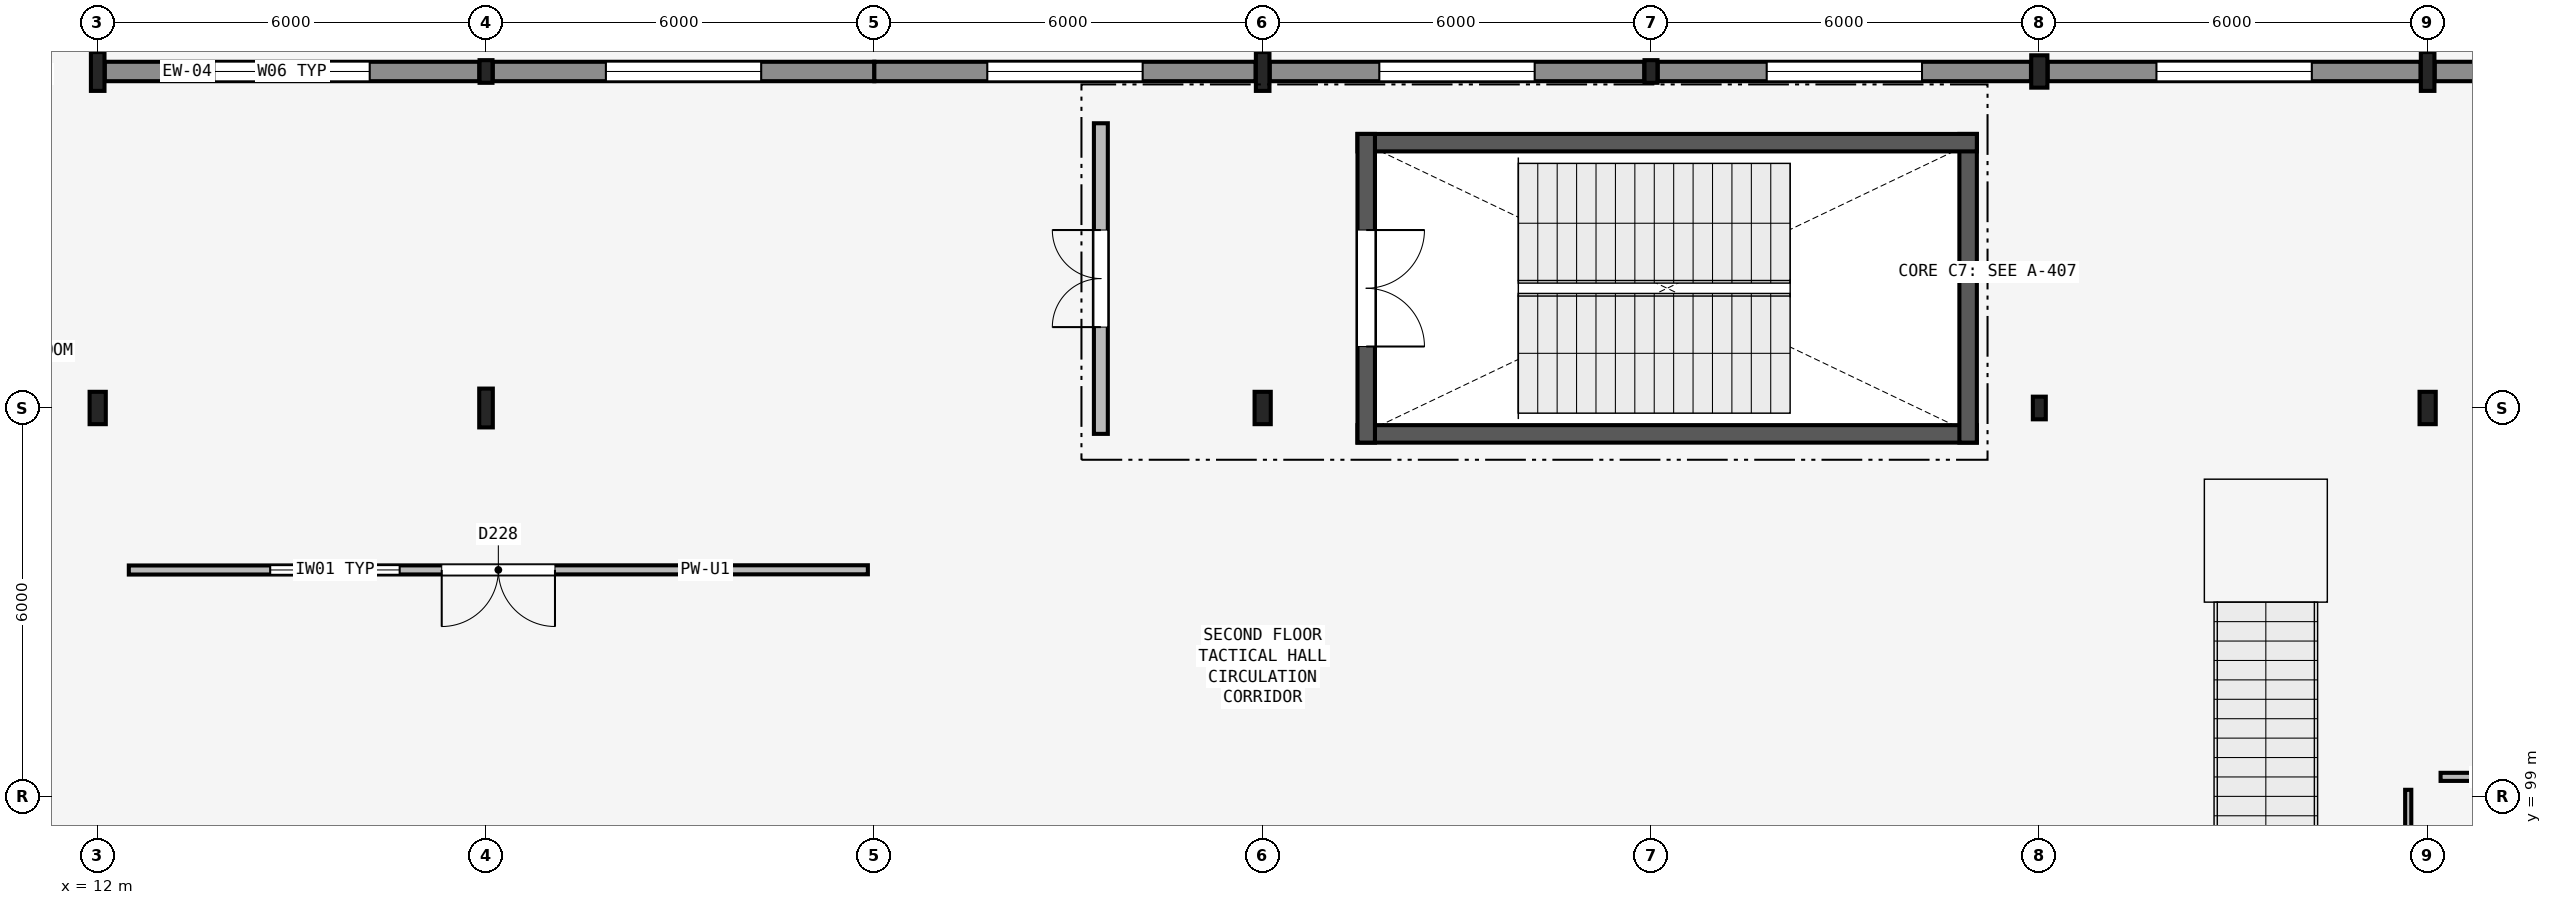
"""IFC4 building model, lengths in metres.
Left out: names, types, materials, properties, quantities, classifications, styles, units other than length and angle.
Written with IfcOpenShell. Run it as: python <this file> out.ifc"""

import sys

from ifc_helpers import new_model, si_unit, direction, frame, frame_2d, origin, origin_2d, place, context, subcontext, project, spatial, rectangle, hollow_rectangle, i_section, extrude, element, fill, save


model = new_model("IFC4")
c1 = context("Model", 3, precision=1e-05, world=origin(), true_north=direction((0.0, 1.0)))
c2 = subcontext(c1, "Body", "Model", "MODEL_VIEW")
j1 = project(units=[si_unit("LENGTHUNIT", "METRE"), si_unit("PLANEANGLEUNIT", "RADIAN")], contexts=[c1])
p1 = place(None, origin())
s1 = spatial("IfcSite", under=j1, at=p1, CompositionType="ELEMENT")
p2 = place(p1, origin())
s2 = spatial("IfcBuilding", under=s1, at=p2, CompositionType="ELEMENT")
p3 = place(p2, frame((0.0, 0.0, 9.3)))
s3 = spatial("IfcBuildingStorey", under=s2, at=p3, CompositionType="ELEMENT", Elevation=9.3)
p4 = place(p3, frame((12.0, 105.0, 0.0), z_axis=(0.0, 0.0, 1.0), x_axis=(1.0, 0.0, 0.0)))
e1 = element("IfcColumn", 1, at=p4, inside=s3, PredefinedType="COLUMN", context=c2, shape_type="SweptSolid", body=[
    extrude(i_section(OverallWidth=0.25, OverallDepth=0.5, WebThickness=0.01, FlangeThickness=0.015, FilletRadius=0.015, at=origin_2d()), origin(), (0.0, 0.0, 1.0), 4.2),
])
for number, where, z_axis, x_axis in (
    (2, (12.0, 110.2, 0.0), (0.0, 0.0, 1.0), (1.0, 0.0, 0.0)),
    (3, (18.0, 105.0, 0.0), (0.0, 0.0, 1.0), (1.0, 0.0, 0.0)),
):
    element("IfcColumn", number, at=place(p3, frame(where, z_axis=z_axis, x_axis=x_axis)), inside=s3, PredefinedType="COLUMN", context=c2, shape_type="SweptSolid", body=[
        extrude(i_section(OverallWidth=0.21, OverallDepth=0.6, WebThickness=0.012, FlangeThickness=0.021, FilletRadius=0.02, at=origin_2d()), origin(), (0.0, 0.0, 1.0), 4.2),
    ])
p5 = place(p3, frame((18.0, 110.2, 0.0), z_axis=(0.0, 0.0, 1.0), x_axis=(1.0, 0.0, 0.0)))
e4 = element("IfcColumn", 4, at=p5, inside=s3, PredefinedType="COLUMN", context=c2, shape_type="SweptSolid", body=[
    extrude(hollow_rectangle(XDim=0.2, YDim=0.35, WallThickness=0.012, InnerFilletRadius=0.012, OuterFilletRadius=0.024, at=origin_2d()), origin(), (0.0, 0.0, 1.0), 4.2),
])
p6 = place(p3, frame((30.0, 105.0, 0.0), z_axis=(0.0, 0.0, 1.0), x_axis=(1.0, 0.0, 0.0)))
e5 = element("IfcColumn", 5, at=p6, inside=s3, PredefinedType="COLUMN", context=c2, shape_type="SweptSolid", body=[
    extrude(i_section(OverallWidth=0.25, OverallDepth=0.5, WebThickness=0.01, FlangeThickness=0.015, FilletRadius=0.015, at=origin_2d()), origin(), (0.0, 0.0, 1.0), 4.2),
])
p7 = place(p3, frame((30.0, 110.2, 0.0), z_axis=(0.0, 0.0, 1.0), x_axis=(1.0, 0.0, 0.0)))
e6 = element("IfcColumn", 6, at=p7, inside=s3, PredefinedType="COLUMN", context=c2, shape_type="SweptSolid", body=[
    extrude(i_section(OverallWidth=0.21, OverallDepth=0.6, WebThickness=0.012, FlangeThickness=0.021, FilletRadius=0.02, at=origin_2d()), origin(), (0.0, 0.0, 1.0), 4.2),
])
for number, where, z_axis, x_axis in (
    (7, (36.0, 110.2, 0.0), (0.0, 0.0, 1.0), (1.0, 0.0, 0.0)),
    (8, (42.0, 105.0, 0.0), (0.0, 0.0, 1.0), (1.0, 0.0, 0.0)),
):
    element("IfcColumn", number, at=place(p3, frame(where, z_axis=z_axis, x_axis=x_axis)), inside=s3, PredefinedType="COLUMN", context=c2, shape_type="SweptSolid", body=[
        extrude(hollow_rectangle(XDim=0.2, YDim=0.35, WallThickness=0.012, InnerFilletRadius=0.012, OuterFilletRadius=0.024, at=origin_2d()), origin(), (0.0, 0.0, 1.0), 4.2),
    ])
for number, where, z_axis, x_axis in (
    (9, (42.0, 110.2, 0.0), (0.0, 0.0, 1.0), (1.0, 0.0, 0.0)),
    (10, (48.0, 105.0, 0.0), (0.0, 0.0, 1.0), (1.0, 0.0, 0.0)),
):
    element("IfcColumn", number, at=place(p3, frame(where, z_axis=z_axis, x_axis=x_axis)), inside=s3, PredefinedType="COLUMN", context=c2, shape_type="SweptSolid", body=[
        extrude(i_section(OverallWidth=0.25, OverallDepth=0.5, WebThickness=0.01, FlangeThickness=0.015, FilletRadius=0.015, at=origin_2d()), origin(), (0.0, 0.0, 1.0), 4.2),
    ])
p8 = place(p3, frame((48.0, 110.2, 0.0), z_axis=(0.0, 0.0, 1.0), x_axis=(1.0, 0.0, 0.0)))
e11 = element("IfcColumn", 11, at=p8, inside=s3, PredefinedType="COLUMN", context=c2, shape_type="SweptSolid", body=[
    extrude(i_section(OverallWidth=0.21, OverallDepth=0.6, WebThickness=0.012, FlangeThickness=0.021, FilletRadius=0.02, at=origin_2d()), origin(), (0.0, 0.0, 1.0), 4.2),
])
p9 = place(p3, frame((12.109, 110.2, 0.0), z_axis=(0.0, 0.0, 1.0), x_axis=(1.0, 0.0, 0.0)))
e12 = element("IfcWall", 12, at=p9, inside=s3, PredefinedType="SOLIDWALL", context=c2, shape_type="SweptSolid", body=[
    extrude(rectangle(XDim=5.787, YDim=0.3, at=frame_2d((2.894, 0.0))), origin(), (0.0, 0.0, 1.0), 3.09),
])
p10 = place(p9, frame((1.694, 0.0, 1.1)))
e13 = element("IfcOpeningElement", 13, at=p10, cuts=e12, PredefinedType="OPENING", context=c2, shape_type="SweptSolid", body=[
    extrude(rectangle(XDim=2.4, YDim=1.2, at=frame_2d((1.2, 0.6))), frame((0.0, 0.16, 0.0), z_axis=(0.0, -1.0, 0.0), x_axis=(1.0, 0.0, 0.0)), (0.0, 0.0, 1.0), 0.32),
])
p11 = place(p3, frame((18.104, 110.2, 0.0), z_axis=(0.0, 0.0, 1.0), x_axis=(1.0, 0.0, 0.0)))
e14 = element("IfcWall", 14, at=p11, inside=s3, PredefinedType="SOLIDWALL", context=c2, shape_type="SweptSolid", body=[
    extrude(rectangle(XDim=5.896, YDim=0.3, at=frame_2d((2.948, 0.0))), origin(), (0.0, 0.0, 1.0), 3.09),
])
p12 = place(p11, frame((1.748, 0.0, 1.1)))
e15 = element("IfcOpeningElement", 15, at=p12, cuts=e14, PredefinedType="OPENING", context=c2, shape_type="SweptSolid", body=[
    extrude(rectangle(XDim=2.4, YDim=1.2, at=frame_2d((1.2, 0.6))), frame((0.0, 0.16, 0.0), z_axis=(0.0, -1.0, 0.0), x_axis=(1.0, 0.0, 0.0)), (0.0, 0.0, 1.0), 0.32),
])
p13 = place(p3, frame((24.0, 110.2, 0.0), z_axis=(0.0, 0.0, 1.0), x_axis=(1.0, 0.0, 0.0)))
e16 = element("IfcWall", 16, at=p13, inside=s3, PredefinedType="SOLIDWALL", context=c2, shape_type="SweptSolid", body=[
    extrude(rectangle(XDim=5.891, YDim=0.3, at=frame_2d((2.946, 0.0))), origin(), (0.0, 0.0, 1.0), 3.09),
])
p14 = place(p13, frame((1.746, 0.0, 1.1)))
e17 = element("IfcOpeningElement", 17, at=p14, cuts=e16, PredefinedType="OPENING", context=c2, shape_type="SweptSolid", body=[
    extrude(rectangle(XDim=2.4, YDim=1.2, at=frame_2d((1.2, 0.6))), frame((0.0, 0.16, 0.0), z_axis=(0.0, -1.0, 0.0), x_axis=(1.0, 0.0, 0.0)), (0.0, 0.0, 1.0), 0.32),
])
p15 = place(p3, frame((30.109, 110.2, 0.0), z_axis=(0.0, 0.0, 1.0), x_axis=(1.0, 0.0, 0.0)))
e18 = element("IfcWall", 18, at=p15, inside=s3, PredefinedType="SOLIDWALL", context=c2, shape_type="SweptSolid", body=[
    extrude(rectangle(XDim=5.787, YDim=0.3, at=frame_2d((2.894, 0.0))), origin(), (0.0, 0.0, 1.0), 3.09),
])
p16 = place(p15, frame((1.694, 0.0, 1.1)))
e19 = element("IfcOpeningElement", 19, at=p16, cuts=e18, PredefinedType="OPENING", context=c2, shape_type="SweptSolid", body=[
    extrude(rectangle(XDim=2.4, YDim=1.2, at=frame_2d((1.2, 0.6))), frame((0.0, 0.16, 0.0), z_axis=(0.0, -1.0, 0.0), x_axis=(1.0, 0.0, 0.0)), (0.0, 0.0, 1.0), 0.32),
])
p17 = place(p3, frame((36.104, 110.2, 0.0), z_axis=(0.0, 0.0, 1.0), x_axis=(1.0, 0.0, 0.0)))
e20 = element("IfcWall", 20, at=p17, inside=s3, PredefinedType="SOLIDWALL", context=c2, shape_type="SweptSolid", body=[
    extrude(rectangle(XDim=5.767, YDim=0.3, at=frame_2d((2.884, 0.0))), origin(), (0.0, 0.0, 1.0), 3.39),
])
p18 = place(p17, frame((1.684, 0.0, 1.1)))
e21 = element("IfcOpeningElement", 21, at=p18, cuts=e20, PredefinedType="OPENING", context=c2, shape_type="SweptSolid", body=[
    extrude(rectangle(XDim=2.4, YDim=1.2, at=frame_2d((1.2, 0.6))), frame((0.0, 0.16, 0.0), z_axis=(0.0, -1.0, 0.0), x_axis=(1.0, 0.0, 0.0)), (0.0, 0.0, 1.0), 0.32),
])
p19 = place(p3, frame((42.129, 110.2, 0.0), z_axis=(0.0, 0.0, 1.0), x_axis=(1.0, 0.0, 0.0)))
e22 = element("IfcWall", 22, at=p19, inside=s3, PredefinedType="SOLIDWALL", context=c2, shape_type="SweptSolid", body=[
    extrude(rectangle(XDim=5.762, YDim=0.3, at=frame_2d((2.881, 0.0))), origin(), (0.0, 0.0, 1.0), 3.39),
])
p20 = place(p19, frame((1.681, 0.0, 1.1)))
e23 = element("IfcOpeningElement", 23, at=p20, cuts=e22, PredefinedType="OPENING", context=c2, shape_type="SweptSolid", body=[
    extrude(rectangle(XDim=2.4, YDim=1.2, at=frame_2d((1.2, 0.6))), frame((0.0, 0.16, 0.0), z_axis=(0.0, -1.0, 0.0), x_axis=(1.0, 0.0, 0.0)), (0.0, 0.0, 1.0), 0.32),
])
p21 = place(p3, frame((48.109, 110.2, 0.0), z_axis=(0.0, 0.0, 1.0), x_axis=(1.0, 0.0, 0.0)))
e24 = element("IfcWall", 24, at=p21, inside=s3, PredefinedType="SOLIDWALL", context=c2, shape_type="SweptSolid", body=[
    extrude(rectangle(XDim=5.787, YDim=0.3, at=frame_2d((2.894, 0.0))), origin(), (0.0, 0.0, 1.0), 3.09),
])
p22 = place(p21, frame((1.694, 0.0, 1.1)))
e25 = element("IfcOpeningElement", 25, at=p22, cuts=e24, PredefinedType="OPENING", context=c2, shape_type="SweptSolid", body=[
    extrude(rectangle(XDim=2.4, YDim=1.2, at=frame_2d((1.2, 0.6))), frame((0.0, 0.16, 0.0), z_axis=(0.0, -1.0, 0.0), x_axis=(1.0, 0.0, 0.0)), (0.0, 0.0, 1.0), 0.32),
])
p23 = place(p3, frame((31.465, 104.6, 0.0), z_axis=(0.0, 0.0, 1.0), x_axis=(1.0, 0.0, 0.0)))
e26 = element("IfcWall", 26, at=p23, inside=s3, PredefinedType="SHEAR", context=c2, shape_type="SweptSolid", body=[
    extrude(rectangle(XDim=9.57, YDim=0.27, at=frame_2d((4.785, 0.0))), origin(), (0.0, 0.0, 1.0), 4.06),
])
p24 = place(p3, frame((40.9, 104.465, 0.0), z_axis=(0.0, 0.0, 1.0), x_axis=(0.0, 1.0, 0.0)))
e27 = element("IfcWall", 27, at=p24, inside=s3, PredefinedType="SHEAR", context=c2, shape_type="SweptSolid", body=[
    extrude(rectangle(XDim=4.77, YDim=0.27, at=frame_2d((2.385, 0.0))), origin(), (0.0, 0.0, 1.0), 4.06),
])
p25 = place(p3, frame((41.035, 109.1, 0.0), z_axis=(0.0, 0.0, 1.0), x_axis=(-1.0, 0.0, 0.0)))
e28 = element("IfcWall", 28, at=p25, inside=s3, PredefinedType="SHEAR", context=c2, shape_type="SweptSolid", body=[
    extrude(rectangle(XDim=9.57, YDim=0.27, at=frame_2d((4.785, 0.0))), origin(), (0.0, 0.0, 1.0), 4.06),
])
p26 = place(p3, frame((31.6, 109.235, 0.0), z_axis=(0.0, 0.0, 1.0), x_axis=(0.0, -1.0, 0.0)))
e29 = element("IfcWall", 29, at=p26, inside=s3, PredefinedType="SHEAR", context=c2, shape_type="SweptSolid", body=[
    extrude(rectangle(XDim=4.77, YDim=0.27, at=frame_2d((2.385, 0.0))), origin(), (0.0, 0.0, 1.0), 4.06),
])
p27 = place(p26, frame((1.485, 0.0, 0.0)))
e30 = element("IfcOpeningElement", 30, at=p27, cuts=e29, PredefinedType="OPENING", context=c2, shape_type="SweptSolid", body=[
    extrude(rectangle(XDim=1.8, YDim=2.2, at=frame_2d((0.9, 1.1))), frame((0.0, 0.145, 0.0), z_axis=(0.0, -1.0, 0.0), x_axis=(1.0, 0.0, 0.0)), (0.0, 0.0, 1.0), 0.29),
])
p28 = place(p3, frame((27.5, 104.6, 0.0), z_axis=(0.0, 0.0, 1.0), x_axis=(0.0, 1.0, 0.0)))
e31 = element("IfcWall", 31, at=p28, inside=s3, PredefinedType="PARTITIONING", context=c2, shape_type="SweptSolid", body=[
    extrude(rectangle(XDim=4.8, YDim=0.215, at=frame_2d((2.4, 0.0))), origin(), (0.0, 0.0, 1.0), 3.09),
])
p29 = place(p28, frame((1.65, 0.0, 0.0)))
e32 = element("IfcOpeningElement", 32, at=p29, cuts=e31, PredefinedType="OPENING", context=c2, shape_type="SweptSolid", body=[
    extrude(rectangle(XDim=1.5, YDim=2.15, at=frame_2d((0.75, 1.075))), frame((0.0, 0.117, 0.0), z_axis=(0.0, -1.0, 0.0), x_axis=(1.0, 0.0, 0.0)), (0.0, 0.0, 1.0), 0.235),
])
p30 = place(p3, frame((47.7, 99.1, 0.0), z_axis=(0.0, 0.0, 1.0), x_axis=(0.0, -1.0, 0.0)))
e33 = element("IfcWall", 33, at=p30, inside=s3, PredefinedType="PARTITIONING", context=c2, shape_type="SweptSolid", body=[
    extrude(rectangle(XDim=23.6, YDim=0.095, at=frame_2d((11.8, 0.0))), origin(), (0.0, 0.0, 1.0), 2.69),
])
p31 = place(p30, frame((10.925, 0.0, 0.0)))
e34 = element("IfcOpeningElement", 34, at=p31, cuts=e33, PredefinedType="OPENING", context=c2, shape_type="SweptSolid", body=[
    extrude(rectangle(XDim=1.75, YDim=2.25, at=frame_2d((0.875, 1.125))), frame((0.0, 0.057, 0.0), z_axis=(0.0, -1.0, 0.0), x_axis=(1.0, 0.0, 0.0)), (0.0, 0.0, 1.0), 0.115),
])
p32 = place(p30, frame((13.325, 0.0, 1.0)))
e35 = element("IfcOpeningElement", 35, at=p32, cuts=e33, PredefinedType="OPENING", context=c2, shape_type="SweptSolid", body=[
    extrude(rectangle(XDim=1.5, YDim=1.2, at=frame_2d((0.75, 0.6))), frame((0.0, 0.057, 0.0), z_axis=(0.0, -1.0, 0.0), x_axis=(1.0, 0.0, 0.0)), (0.0, 0.0, 1.0), 0.115),
])
p33 = place(p3, frame((48.2, 99.3, 0.0), z_axis=(0.0, 0.0, 1.0), x_axis=(1.0, 0.0, 0.0)))
e36 = element("IfcWall", 36, at=p33, inside=s3, PredefinedType="PARTITIONING", context=c2, shape_type="SweptSolid", body=[
    extrude(rectangle(XDim=5.3, YDim=0.125, at=frame_2d((2.65, 0.0))), origin(), (0.0, 0.0, 1.0), 2.69),
])
p34 = place(p33, frame((1.775, 0.0, 0.0)))
e37 = element("IfcOpeningElement", 37, at=p34, cuts=e36, PredefinedType="OPENING", context=c2, shape_type="SweptSolid", body=[
    extrude(rectangle(XDim=1.75, YDim=2.25, at=frame_2d((0.875, 1.125))), frame((0.0, 0.073, 0.0), z_axis=(0.0, -1.0, 0.0), x_axis=(1.0, 0.0, 0.0)), (0.0, 0.0, 1.0), 0.145),
])
p35 = place(p3, frame((23.9, 102.5, 0.0), z_axis=(0.0, 0.0, 1.0), x_axis=(-0.999999948574, -0.000320704679, 0.0)))
e38 = element("IfcWall", 38, at=p35, inside=s3, PredefinedType="PARTITIONING", context=c2, shape_type="SweptSolid", body=[
    extrude(rectangle(XDim=11.419, YDim=0.14, at=frame_2d((5.709, 0.0))), origin(), (0.0, 0.0, 1.0), 2.69),
])
p36 = place(p35, frame((4.835, 0.0, 0.0)))
e39 = element("IfcOpeningElement", 39, at=p36, cuts=e38, PredefinedType="OPENING", context=c2, shape_type="SweptSolid", body=[
    extrude(rectangle(XDim=1.75, YDim=2.25, at=frame_2d((0.875, 1.125))), frame((0.0, 0.08, 0.0), z_axis=(0.0, -1.0, 0.0), x_axis=(1.0, 0.0, 0.0)), (0.0, 0.0, 1.0), 0.16),
])
p37 = place(p35, frame((7.235, 0.0, 1.0)))
e40 = element("IfcOpeningElement", 40, at=p37, cuts=e38, PredefinedType="OPENING", context=c2, shape_type="SweptSolid", body=[
    extrude(rectangle(XDim=2.0, YDim=1.2, at=frame_2d((1.0, 0.6))), frame((0.0, 0.08, 0.0), z_axis=(0.0, -1.0, 0.0), x_axis=(1.0, 0.0, 0.0)), (0.0, 0.0, 1.0), 0.16),
])
p38 = place(p10, origin())
e41 = element("IfcWindow", 41, at=p38, inside=s3, PartitioningType="SINGLE_PANEL", PredefinedType="WINDOW", context=c2, shape_type="SweptSolid", body=[
    extrude(rectangle(XDim=2.4, YDim=1.2, at=frame_2d((1.2, 0.6))), frame((0.0, 0.03, 0.0), z_axis=(0.0, -1.0, 0.0), x_axis=(1.0, 0.0, 0.0)), (0.0, 0.0, 1.0), 0.06),
])
fill(e13, e41)
p39 = place(p12, origin())
e42 = element("IfcWindow", 42, at=p39, inside=s3, PartitioningType="SINGLE_PANEL", PredefinedType="WINDOW", context=c2, shape_type="SweptSolid", body=[
    extrude(rectangle(XDim=2.4, YDim=1.2, at=frame_2d((1.2, 0.6))), frame((0.0, 0.03, 0.0), z_axis=(0.0, -1.0, 0.0), x_axis=(1.0, 0.0, 0.0)), (0.0, 0.0, 1.0), 0.06),
])
fill(e15, e42)
p40 = place(p14, origin())
e43 = element("IfcWindow", 43, at=p40, inside=s3, PartitioningType="SINGLE_PANEL", PredefinedType="WINDOW", context=c2, shape_type="SweptSolid", body=[
    extrude(rectangle(XDim=2.4, YDim=1.2, at=frame_2d((1.2, 0.6))), frame((0.0, 0.03, 0.0), z_axis=(0.0, -1.0, 0.0), x_axis=(1.0, 0.0, 0.0)), (0.0, 0.0, 1.0), 0.06),
])
fill(e17, e43)
p41 = place(p16, origin())
e44 = element("IfcWindow", 44, at=p41, inside=s3, PartitioningType="SINGLE_PANEL", PredefinedType="WINDOW", context=c2, shape_type="SweptSolid", body=[
    extrude(rectangle(XDim=2.4, YDim=1.2, at=frame_2d((1.2, 0.6))), frame((0.0, 0.03, 0.0), z_axis=(0.0, -1.0, 0.0), x_axis=(1.0, 0.0, 0.0)), (0.0, 0.0, 1.0), 0.06),
])
fill(e19, e44)
p42 = place(p18, origin())
e45 = element("IfcWindow", 45, at=p42, inside=s3, PartitioningType="SINGLE_PANEL", PredefinedType="WINDOW", context=c2, shape_type="SweptSolid", body=[
    extrude(rectangle(XDim=2.4, YDim=1.2, at=frame_2d((1.2, 0.6))), frame((0.0, 0.03, 0.0), z_axis=(0.0, -1.0, 0.0), x_axis=(1.0, 0.0, 0.0)), (0.0, 0.0, 1.0), 0.06),
])
fill(e21, e45)
p43 = place(p20, origin())
e46 = element("IfcWindow", 46, at=p43, inside=s3, PartitioningType="SINGLE_PANEL", PredefinedType="WINDOW", context=c2, shape_type="SweptSolid", body=[
    extrude(rectangle(XDim=2.4, YDim=1.2, at=frame_2d((1.2, 0.6))), frame((0.0, 0.03, 0.0), z_axis=(0.0, -1.0, 0.0), x_axis=(1.0, 0.0, 0.0)), (0.0, 0.0, 1.0), 0.06),
])
fill(e23, e46)
p44 = place(p27, origin())
e47 = element("IfcDoor", 47, at=p44, inside=s3, OperationType="DOUBLE_DOOR_SINGLE_SWING", PredefinedType="DOOR", context=c2, shape_type="SweptSolid", body=[
    extrude(rectangle(XDim=1.8, YDim=2.2, at=frame_2d((0.9, 1.1))), frame((0.0, 0.025, 0.0), z_axis=(0.0, -1.0, 0.0), x_axis=(1.0, 0.0, 0.0)), (0.0, 0.0, 1.0), 0.05),
])
fill(e30, e47)
p45 = place(p29, origin())
e48 = element("IfcDoor", 48, at=p45, inside=s3, OperationType="DOUBLE_DOOR_SINGLE_SWING", PredefinedType="DOOR", context=c2, shape_type="SweptSolid", body=[
    extrude(rectangle(XDim=1.5, YDim=2.15, at=frame_2d((0.75, 1.075))), frame((0.0, 0.025, 0.0), z_axis=(0.0, -1.0, 0.0), x_axis=(1.0, 0.0, 0.0)), (0.0, 0.0, 1.0), 0.05),
])
fill(e32, e48)
p46 = place(p36, origin())
e49 = element("IfcDoor", 49, at=p46, inside=s3, OperationType="DOUBLE_DOOR_SINGLE_SWING", PredefinedType="DOOR", context=c2, shape_type="SweptSolid", body=[
    extrude(rectangle(XDim=1.75, YDim=2.25, at=frame_2d((0.875, 1.125))), frame((0.0, 0.025, 0.0), z_axis=(0.0, -1.0, 0.0), x_axis=(1.0, 0.0, 0.0)), (0.0, 0.0, 1.0), 0.05),
])
fill(e39, e49)
p47 = place(p37, origin())
e50 = element("IfcWindow", 50, at=p47, inside=s3, PartitioningType="SINGLE_PANEL", PredefinedType="WINDOW", context=c2, shape_type="SweptSolid", body=[
    extrude(rectangle(XDim=2.0, YDim=1.2, at=frame_2d((1.0, 0.6))), frame((0.0, 0.03, 0.0), z_axis=(0.0, -1.0, 0.0), x_axis=(1.0, 0.0, 0.0)), (0.0, 0.0, 1.0), 0.06),
])
fill(e40, e50)
save(model, sys.argv[1])
